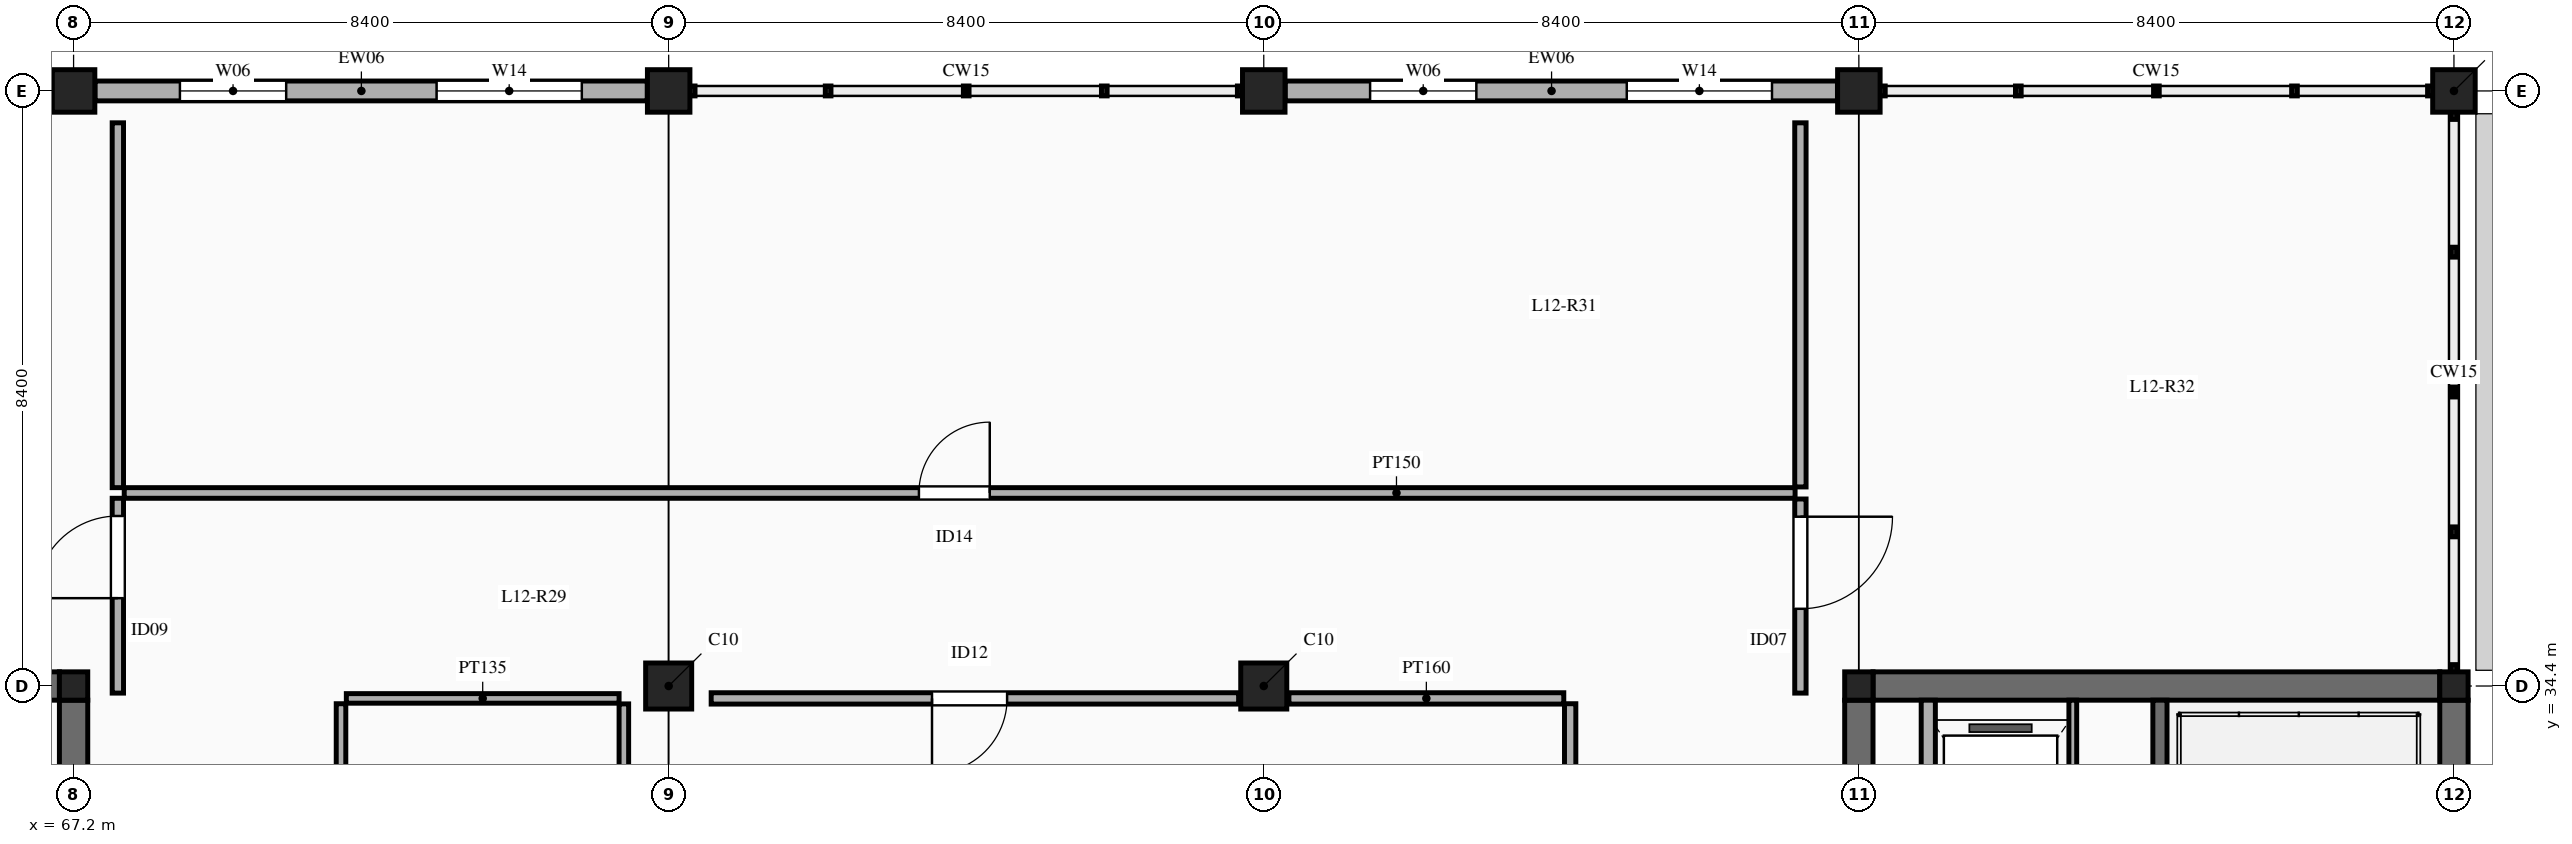
"""IFC4 building model, lengths in metres.
Left out: names, types, materials, properties, quantities, classifications, styles, units other than length and angle.
Written with IfcOpenShell. Run it as: python <this file> out.ifc"""

import sys

from ifc_helpers import new_model, si_unit, direction, frame, frame_2d, origin, origin_2d, place, context, subcontext, project, spatial, rectangle, extrude, element, fill, save


model = new_model("IFC4")
c1 = context("Model", 3, precision=1e-05, world=origin(), true_north=direction((0.0, 1.0)))
c2 = subcontext(c1, "Body", "Model", "MODEL_VIEW")
j1 = project(units=[si_unit("LENGTHUNIT", "METRE"), si_unit("PLANEANGLEUNIT", "RADIAN")], contexts=[c1])
p1 = place(None, origin())
s1 = spatial("IfcSite", under=j1, at=p1, CompositionType="ELEMENT")
p2 = place(p1, origin())
s2 = spatial("IfcBuilding", under=s1, at=p2, CompositionType="ELEMENT")
p3 = place(p2, frame((0.0, 0.0, 55.5)))
s3 = spatial("IfcBuildingStorey", under=s2, at=p3, CompositionType="ELEMENT", Elevation=55.5)
p4 = place(p3, frame((67.2, 34.4, 0.0), z_axis=(0.0, 0.0, 1.0), x_axis=(1.0, 0.0, 0.0)))
e1 = element("IfcColumn", 1, at=p4, inside=s3, PredefinedType="COLUMN", context=c2, shape_type="SweptSolid", body=[
    extrude(rectangle(XDim=0.4, YDim=0.4, at=origin_2d()), origin(), (0.0, 0.0, 1.0), 4.5),
])
p5 = place(p3, frame((67.2, 42.8, 0.0), z_axis=(0.0, 0.0, 1.0), x_axis=(1.0, 0.0, 0.0)))
e2 = element("IfcColumn", 2, at=p5, inside=s3, PredefinedType="COLUMN", context=c2, shape_type="SweptSolid", body=[
    extrude(rectangle(XDim=0.6, YDim=0.6, at=origin_2d()), origin(), (0.0, 0.0, 1.0), 4.5),
])
p6 = place(p3, frame((75.6, 34.4, 0.0), z_axis=(0.0, 0.0, 1.0), x_axis=(1.0, 0.0, 0.0)))
e3 = element("IfcColumn", 3, at=p6, inside=s3, PredefinedType="COLUMN", context=c2, shape_type="SweptSolid", body=[
    extrude(rectangle(XDim=0.65, YDim=0.65, at=origin_2d()), origin(), (0.0, 0.0, 1.0), 4.5),
])
p7 = place(p3, frame((75.6, 42.8, 0.0), z_axis=(0.0, 0.0, 1.0), x_axis=(1.0, 0.0, 0.0)))
e4 = element("IfcColumn", 4, at=p7, inside=s3, PredefinedType="COLUMN", context=c2, shape_type="SweptSolid", body=[
    extrude(rectangle(XDim=0.6, YDim=0.6, at=origin_2d()), origin(), (0.0, 0.0, 1.0), 4.5),
])
p8 = place(p3, frame((84.0, 34.4, 0.0), z_axis=(0.0, 0.0, 1.0), x_axis=(1.0, 0.0, 0.0)))
e5 = element("IfcColumn", 5, at=p8, inside=s3, PredefinedType="COLUMN", context=c2, shape_type="SweptSolid", body=[
    extrude(rectangle(XDim=0.65, YDim=0.65, at=origin_2d()), origin(), (0.0, 0.0, 1.0), 4.5),
])
p9 = place(p3, frame((84.0, 42.8, 0.0), z_axis=(0.0, 0.0, 1.0), x_axis=(1.0, 0.0, 0.0)))
e6 = element("IfcColumn", 6, at=p9, inside=s3, PredefinedType="COLUMN", context=c2, shape_type="SweptSolid", body=[
    extrude(rectangle(XDim=0.6, YDim=0.6, at=origin_2d()), origin(), (0.0, 0.0, 1.0), 4.5),
])
p10 = place(p3, frame((92.4, 34.4, 0.0), z_axis=(0.0, 0.0, 1.0), x_axis=(1.0, 0.0, 0.0)))
e7 = element("IfcColumn", 7, at=p10, inside=s3, PredefinedType="COLUMN", context=c2, shape_type="SweptSolid", body=[
    extrude(rectangle(XDim=0.4, YDim=0.4, at=origin_2d()), origin(), (0.0, 0.0, 1.0), 4.5),
])
p11 = place(p3, frame((92.4, 42.8, 0.0), z_axis=(0.0, 0.0, 1.0), x_axis=(1.0, 0.0, 0.0)))
e8 = element("IfcColumn", 8, at=p11, inside=s3, PredefinedType="COLUMN", context=c2, shape_type="SweptSolid", body=[
    extrude(rectangle(XDim=0.6, YDim=0.6, at=origin_2d()), origin(), (0.0, 0.0, 1.0), 4.5),
])
p12 = place(p3, frame((100.8, 34.4, 0.0), z_axis=(0.0, 0.0, 1.0), x_axis=(1.0, 0.0, 0.0)))
e9 = element("IfcColumn", 9, at=p12, inside=s3, PredefinedType="COLUMN", context=c2, shape_type="SweptSolid", body=[
    extrude(rectangle(XDim=0.4, YDim=0.4, at=origin_2d()), origin(), (0.0, 0.0, 1.0), 4.5),
])
p13 = place(p3, frame((100.8, 42.8, 0.0), z_axis=(0.0, 0.0, 1.0), x_axis=(1.0, 0.0, 0.0)))
e10 = element("IfcColumn", 10, at=p13, inside=s3, PredefinedType="COLUMN", context=c2, shape_type="SweptSolid", body=[
    extrude(rectangle(XDim=0.6, YDim=0.6, at=origin_2d()), origin(), (0.0, 0.0, 1.0), 4.5),
])
for number, where, z_axis, x_axis in (
    (11, (67.2, 26.2, 0.0), (0.0, 0.0, 1.0), (0.0, 1.0, 0.0)),
    (12, (59.0, 34.4, 0.0), (0.0, 0.0, 1.0), (1.0, 0.0, 0.0)),
    (13, (92.4, 26.2, 0.0), (0.0, 0.0, 1.0), (0.0, 1.0, 0.0)),
    (14, (100.8, 26.2, 0.0), (0.0, 0.0, 1.0), (0.0, 1.0, 0.0)),
    (15, (92.6, 34.4, 0.0), (0.0, 0.0, 1.0), (1.0, 0.0, 0.0)),
):
    element("IfcWall", number, at=place(p3, frame(where, z_axis=z_axis, x_axis=x_axis)), inside=s3, PredefinedType="SHEAR", context=c2, shape_type="SweptSolid", body=[
        extrude(rectangle(XDim=8.0, YDim=0.4, at=frame_2d((4.0, 0.0))), origin(), (0.0, 0.0, 1.0), 4.5),
    ])
p14 = place(p3, frame((67.502, 42.8, 0.0), z_axis=(0.0, 0.0, 1.0), x_axis=(1.0, 0.0, 0.0)))
e16 = element("IfcWall", 16, at=p14, inside=s3, PredefinedType="ELEMENTEDWALL", context=c2, shape_type="SweptSolid", body=[
    extrude(rectangle(XDim=7.796, YDim=0.28, at=frame_2d((3.898, 0.0))), origin(), (0.0, 0.0, 1.0), 3.55),
])
p15 = place(p14, frame((1.199, 0.0, 0.9)))
e17 = element("IfcOpeningElement", 17, at=p15, cuts=e16, PredefinedType="OPENING", context=c2, shape_type="SweptSolid", body=[
    extrude(rectangle(XDim=1.5, YDim=2.0, at=frame_2d((0.75, 1.0))), frame((0.0, 0.15, 0.0), z_axis=(0.0, -1.0, 0.0), x_axis=(1.0, 0.0, 0.0)), (0.0, 0.0, 1.0), 0.3),
])
p16 = place(p14, frame((4.822, 0.0, 0.9)))
e18 = element("IfcOpeningElement", 18, at=p16, cuts=e16, PredefinedType="OPENING", context=c2, shape_type="SweptSolid", body=[
    extrude(rectangle(XDim=2.05, YDim=2.1, at=frame_2d((1.025, 1.05))), frame((0.0, 0.15, 0.0), z_axis=(0.0, -1.0, 0.0), x_axis=(1.0, 0.0, 0.0)), (0.0, 0.0, 1.0), 0.3),
])
p17 = place(p3, frame((84.302, 42.8, 0.0), z_axis=(0.0, 0.0, 1.0), x_axis=(1.0, 0.0, 0.0)))
e19 = element("IfcWall", 19, at=p17, inside=s3, PredefinedType="ELEMENTEDWALL", context=c2, shape_type="SweptSolid", body=[
    extrude(rectangle(XDim=7.796, YDim=0.28, at=frame_2d((3.898, 0.0))), origin(), (0.0, 0.0, 1.0), 3.55),
])
p18 = place(p17, frame((1.199, 0.0, 0.9)))
e20 = element("IfcOpeningElement", 20, at=p18, cuts=e19, PredefinedType="OPENING", context=c2, shape_type="SweptSolid", body=[
    extrude(rectangle(XDim=1.5, YDim=2.0, at=frame_2d((0.75, 1.0))), frame((0.0, 0.15, 0.0), z_axis=(0.0, -1.0, 0.0), x_axis=(1.0, 0.0, 0.0)), (0.0, 0.0, 1.0), 0.3),
])
p19 = place(p17, frame((4.822, 0.0, 0.9)))
e21 = element("IfcOpeningElement", 21, at=p19, cuts=e19, PredefinedType="OPENING", context=c2, shape_type="SweptSolid", body=[
    extrude(rectangle(XDim=2.05, YDim=2.1, at=frame_2d((1.025, 1.05))), frame((0.0, 0.15, 0.0), z_axis=(0.0, -1.0, 0.0), x_axis=(1.0, 0.0, 0.0)), (0.0, 0.0, 1.0), 0.3),
])
p20 = place(p3, frame((96.65, 26.1, 0.0), z_axis=(0.0, 0.0, 1.0), x_axis=(0.0, 1.0, 0.0)))
e22 = element("IfcWall", 22, at=p20, inside=s3, PredefinedType="SOLIDWALL", context=c2, shape_type="SweptSolid", body=[
    extrude(rectangle(XDim=8.1, YDim=0.2, at=frame_2d((4.05, 0.0))), origin(), (0.0, 0.0, 1.0), 4.3),
])
p21 = place(p20, frame((0.45, 0.0, 0.0)))
e23 = element("IfcOpeningElement", 23, at=p21, cuts=e22, PredefinedType="OPENING", context=c2, shape_type="SweptSolid", body=[
    extrude(rectangle(XDim=1.12, YDim=2.15, at=frame_2d((0.56, 1.075))), frame((0.0, 0.11, 0.0), z_axis=(0.0, -1.0, 0.0), x_axis=(1.0, 0.0, 0.0)), (0.0, 0.0, 1.0), 0.22),
])
p22 = place(p3, frame((95.42, 31.15, 0.0), z_axis=(0.0, 0.0, 1.0), x_axis=(0.0, 1.0, 0.0)))
e24 = element("IfcWall", 24, at=p22, inside=s3, PredefinedType="PARTITIONING", context=c2, shape_type="SweptSolid", body=[
    extrude(rectangle(XDim=3.05, YDim=0.11, at=frame_2d((1.525, 0.0))), origin(), (0.0, 0.0, 1.0), 4.3),
])
p23 = place(p3, frame((93.38, 31.15, 0.0), z_axis=(0.0, 0.0, 1.0), x_axis=(0.0, 1.0, 0.0)))
e25 = element("IfcWall", 25, at=p23, inside=s3, PredefinedType="SOLIDWALL", context=c2, shape_type="SweptSolid", body=[
    extrude(rectangle(XDim=3.05, YDim=0.2, at=frame_2d((1.525, 0.0))), origin(), (0.0, 0.0, 1.0), 4.3),
])
p24 = place(p3, frame((70.975, 30.25, 0.0), z_axis=(0.0, 0.0, 1.0), x_axis=(0.0, 1.0, 0.0)))
e26 = element("IfcWall", 26, at=p24, inside=s3, PredefinedType="PARTITIONING", context=c2, shape_type="SweptSolid", body=[
    extrude(rectangle(XDim=3.9, YDim=0.135, at=frame_2d((1.95, 0.0))), origin(), (0.0, 0.0, 1.0), 3.45),
])
p25 = place(p24, frame((1.46, 0.0, 0.0)))
e27 = element("IfcOpeningElement", 27, at=p25, cuts=e26, PredefinedType="OPENING", context=c2, shape_type="SweptSolid", body=[
    extrude(rectangle(XDim=0.98, YDim=2.15, at=frame_2d((0.49, 1.075))), frame((0.0, 0.077, 0.0), z_axis=(0.0, -1.0, 0.0), x_axis=(1.0, 0.0, 0.0)), (0.0, 0.0, 1.0), 0.155),
])
p26 = place(p3, frame((71.05, 34.225, 0.0), z_axis=(0.0, 0.0, 1.0), x_axis=(1.0, 0.0, 0.0)))
e28 = element("IfcWall", 28, at=p26, inside=s3, PredefinedType="PARTITIONING", context=c2, shape_type="SweptSolid", body=[
    extrude(rectangle(XDim=3.85, YDim=0.135, at=frame_2d((1.925, 0.0))), origin(), (0.0, 0.0, 1.0), 3.45),
])
p27 = place(p3, frame((88.325, 29.45, 0.0), z_axis=(0.0, 0.0, 1.0), x_axis=(0.0, 1.0, 0.0)))
e29 = element("IfcWall", 29, at=p27, inside=s3, PredefinedType="PARTITIONING", context=c2, shape_type="SweptSolid", body=[
    extrude(rectangle(XDim=4.7, YDim=0.16, at=frame_2d((2.35, 0.0))), origin(), (0.0, 0.0, 1.0), 3.45),
])
p28 = place(p3, frame((76.2, 34.225, 0.0), z_axis=(0.0, 0.0, 1.0), x_axis=(1.0, 0.0, 0.0)))
e30 = element("IfcWall", 30, at=p28, inside=s3, PredefinedType="PARTITIONING", context=c2, shape_type="SweptSolid", body=[
    extrude(rectangle(XDim=7.445, YDim=0.16, at=frame_2d((3.723, 0.0))), origin(), (0.0, 0.0, 1.0), 3.45),
])
p29 = place(p28, frame((3.117, 0.0, 0.0)))
e31 = element("IfcOpeningElement", 31, at=p29, cuts=e30, PredefinedType="OPENING", context=c2, shape_type="SweptSolid", body=[
    extrude(rectangle(XDim=1.06, YDim=2.18, at=frame_2d((0.53, 1.09))), frame((0.0, 0.09, 0.0), z_axis=(0.0, -1.0, 0.0), x_axis=(1.0, 0.0, 0.0)), (0.0, 0.0, 1.0), 0.18),
])
p30 = place(p3, frame((84.355, 34.225, 0.0), z_axis=(0.0, 0.0, 1.0), x_axis=(1.0, 0.0, 0.0)))
e32 = element("IfcWall", 32, at=p30, inside=s3, PredefinedType="PARTITIONING", context=c2, shape_type="SweptSolid", body=[
    extrude(rectangle(XDim=3.88, YDim=0.16, at=frame_2d((1.94, 0.0))), origin(), (0.0, 0.0, 1.0), 3.45),
])
p31 = place(p3, frame((67.825, 34.3, 0.0), z_axis=(0.0, 0.0, 1.0), x_axis=(0.0, 1.0, 0.0)))
e33 = element("IfcWall", 33, at=p31, inside=s3, PredefinedType="PARTITIONING", context=c2, shape_type="SweptSolid", body=[
    extrude(rectangle(XDim=2.75, YDim=0.16, at=frame_2d((1.375, 0.0))), origin(), (0.0, 0.0, 1.0), 3.45),
])
p32 = place(p31, frame((1.34, 0.0, 0.0)))
e34 = element("IfcOpeningElement", 34, at=p32, cuts=e33, PredefinedType="OPENING", context=c2, shape_type="SweptSolid", body=[
    extrude(rectangle(XDim=1.16, YDim=2.2, at=frame_2d((0.58, 1.1))), frame((0.0, 0.09, 0.0), z_axis=(0.0, -1.0, 0.0), x_axis=(1.0, 0.0, 0.0)), (0.0, 0.0, 1.0), 0.18),
])
p33 = place(p3, frame((67.915, 37.125, 0.0), z_axis=(0.0, 0.0, 1.0), x_axis=(1.0, 0.0, 0.0)))
e35 = element("IfcWall", 35, at=p33, inside=s3, PredefinedType="PARTITIONING", context=c2, shape_type="SweptSolid", body=[
    extrude(rectangle(XDim=23.585, YDim=0.15, at=frame_2d((11.792, 0.0))), origin(), (0.0, 0.0, 1.0), 3.45),
])
p34 = place(p33, frame((11.217, 0.0, 0.0)))
e36 = element("IfcOpeningElement", 36, at=p34, cuts=e35, PredefinedType="OPENING", context=c2, shape_type="SweptSolid", body=[
    extrude(rectangle(XDim=1.0, YDim=2.15, at=frame_2d((0.5, 1.075))), frame((0.0, 0.085, 0.0), z_axis=(0.0, -1.0, 0.0), x_axis=(1.0, 0.0, 0.0)), (0.0, 0.0, 1.0), 0.17),
])
p35 = place(p3, frame((91.575, 34.3, 0.0), z_axis=(0.0, 0.0, 1.0), x_axis=(0.0, 1.0, 0.0)))
e37 = element("IfcWall", 37, at=p35, inside=s3, PredefinedType="PARTITIONING", context=c2, shape_type="SweptSolid", body=[
    extrude(rectangle(XDim=2.74, YDim=0.16, at=frame_2d((1.37, 0.0))), origin(), (0.0, 0.0, 1.0), 3.45),
])
p36 = place(p35, frame((1.19, 0.0, 0.0)))
e38 = element("IfcOpeningElement", 38, at=p36, cuts=e37, PredefinedType="OPENING", context=c2, shape_type="SweptSolid", body=[
    extrude(rectangle(XDim=1.3, YDim=2.25, at=frame_2d((0.65, 1.125))), frame((0.0, 0.09, 0.0), z_axis=(0.0, -1.0, 0.0), x_axis=(1.0, 0.0, 0.0)), (0.0, 0.0, 1.0), 0.18),
])
p37 = place(p3, frame((67.825, 37.2, 0.0), z_axis=(0.0, 0.0, 1.0), x_axis=(0.0, 1.0, 0.0)))
e39 = element("IfcWall", 39, at=p37, inside=s3, PredefinedType="PARTITIONING", context=c2, shape_type="SweptSolid", body=[
    extrude(rectangle(XDim=5.15, YDim=0.16, at=frame_2d((2.575, 0.0))), origin(), (0.0, 0.0, 1.0), 3.45),
])
p38 = place(p3, frame((91.575, 37.21, 0.0), z_axis=(0.0, 0.0, 1.0), x_axis=(0.0, 1.0, 0.0)))
e40 = element("IfcWall", 40, at=p38, inside=s3, PredefinedType="PARTITIONING", context=c2, shape_type="SweptSolid", body=[
    extrude(rectangle(XDim=5.14, YDim=0.16, at=frame_2d((2.57, 0.0))), origin(), (0.0, 0.0, 1.0), 3.45),
])
p39 = place(p3, frame((74.968, 30.252, 0.0), z_axis=(0.0, 0.0, 1.0), x_axis=(0.0, 1.0, 0.0)))
e41 = element("IfcWall", 41, at=p39, inside=s3, PredefinedType="PARTITIONING", context=c2, shape_type="SweptSolid", body=[
    extrude(rectangle(XDim=3.895, YDim=0.135, at=frame_2d((1.948, 0.0))), origin(), (0.0, 0.0, 1.0), 3.45),
])
p40 = place(p15, origin())
e42 = element("IfcWindow", 42, at=p40, inside=s3, PartitioningType="DOUBLE_PANEL_VERTICAL", PredefinedType="WINDOW", context=c2, shape_type="SweptSolid", body=[
    extrude(rectangle(XDim=1.5, YDim=2.0, at=frame_2d((0.75, 1.0))), frame((0.0, 0.03, 0.0), z_axis=(0.0, -1.0, 0.0), x_axis=(1.0, 0.0, 0.0)), (0.0, 0.0, 1.0), 0.06),
])
fill(e17, e42)
p41 = place(p16, origin())
e43 = element("IfcWindow", 43, at=p41, inside=s3, PartitioningType="TRIPLE_PANEL_VERTICAL", PredefinedType="WINDOW", context=c2, shape_type="SweptSolid", body=[
    extrude(rectangle(XDim=2.05, YDim=2.1, at=frame_2d((1.025, 1.05))), frame((0.0, 0.03, 0.0), z_axis=(0.0, -1.0, 0.0), x_axis=(1.0, 0.0, 0.0)), (0.0, 0.0, 1.0), 0.06),
])
fill(e18, e43)
p42 = place(p18, origin())
e44 = element("IfcWindow", 44, at=p42, inside=s3, PartitioningType="DOUBLE_PANEL_VERTICAL", PredefinedType="WINDOW", context=c2, shape_type="SweptSolid", body=[
    extrude(rectangle(XDim=1.5, YDim=2.0, at=frame_2d((0.75, 1.0))), frame((0.0, 0.03, 0.0), z_axis=(0.0, -1.0, 0.0), x_axis=(1.0, 0.0, 0.0)), (0.0, 0.0, 1.0), 0.06),
])
fill(e20, e44)
p43 = place(p19, origin())
e45 = element("IfcWindow", 45, at=p43, inside=s3, PartitioningType="TRIPLE_PANEL_VERTICAL", PredefinedType="WINDOW", context=c2, shape_type="SweptSolid", body=[
    extrude(rectangle(XDim=2.05, YDim=2.1, at=frame_2d((1.025, 1.05))), frame((0.0, 0.03, 0.0), z_axis=(0.0, -1.0, 0.0), x_axis=(1.0, 0.0, 0.0)), (0.0, 0.0, 1.0), 0.06),
])
fill(e21, e45)
p44 = place(p29, frame((1.06, 0.0, 0.0), z_axis=(0.0, 0.0, 1.0), x_axis=(-1.0, 0.0, 0.0)))
e46 = element("IfcDoor", 46, at=p44, inside=s3, OperationType="SINGLE_SWING_RIGHT", PredefinedType="DOOR", context=c2, shape_type="SweptSolid", body=[
    extrude(rectangle(XDim=1.06, YDim=2.18, at=frame_2d((0.53, 1.09))), frame((0.0, 0.025, 0.0), z_axis=(0.0, -1.0, 0.0), x_axis=(1.0, 0.0, 0.0)), (0.0, 0.0, 1.0), 0.05),
])
fill(e31, e46)
p45 = place(p32, origin())
e47 = element("IfcDoor", 47, at=p45, inside=s3, OperationType="SINGLE_SWING_LEFT", PredefinedType="DOOR", context=c2, shape_type="SweptSolid", body=[
    extrude(rectangle(XDim=1.16, YDim=2.2, at=frame_2d((0.58, 1.1))), frame((0.0, 0.025, 0.0), z_axis=(0.0, -1.0, 0.0), x_axis=(1.0, 0.0, 0.0)), (0.0, 0.0, 1.0), 0.05),
])
fill(e34, e47)
p46 = place(p34, origin())
e48 = element("IfcDoor", 48, at=p46, inside=s3, OperationType="SINGLE_SWING_RIGHT", PredefinedType="DOOR", context=c2, shape_type="SweptSolid", body=[
    extrude(rectangle(XDim=1.0, YDim=2.15, at=frame_2d((0.5, 1.075))), frame((0.0, 0.025, 0.0), z_axis=(0.0, -1.0, 0.0), x_axis=(1.0, 0.0, 0.0)), (0.0, 0.0, 1.0), 0.05),
])
fill(e36, e48)
p47 = place(p36, frame((1.3, 0.0, 0.0), z_axis=(0.0, 0.0, 1.0), x_axis=(-1.0, 0.0, 0.0)))
e49 = element("IfcDoor", 49, at=p47, inside=s3, OperationType="SINGLE_SWING_LEFT", PredefinedType="DOOR", context=c2, shape_type="SweptSolid", body=[
    extrude(rectangle(XDim=1.3, YDim=2.25, at=frame_2d((0.65, 1.125))), frame((0.0, 0.025, 0.0), z_axis=(0.0, -1.0, 0.0), x_axis=(1.0, 0.0, 0.0)), (0.0, 0.0, 1.0), 0.05),
])
fill(e38, e49)
save(model, sys.argv[1])
